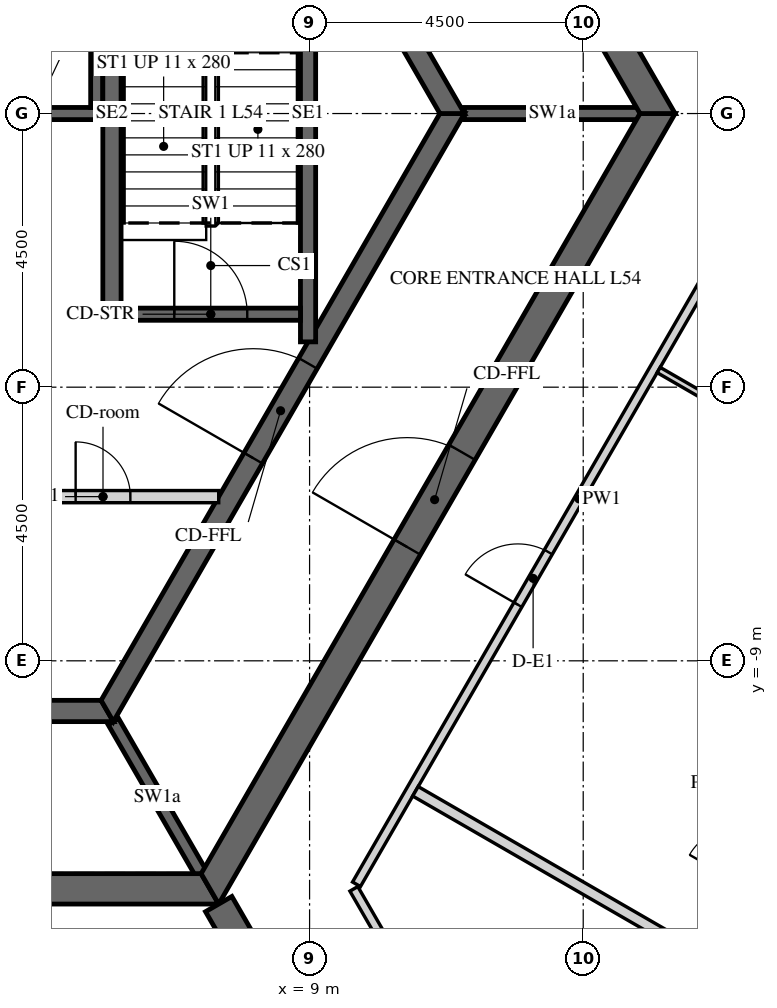
"""IFC4 building model, lengths in metres.
Left out: names, types, materials, properties, quantities, classifications, styles, units other than length and angle.
Written with IfcOpenShell. Run it as: python <this file> out.ifc"""

import sys

from ifc_helpers import new_model, si_unit, direction, frame, frame_2d, origin, place, context, subcontext, project, spatial, polyline, rectangle, outline, extrude, element, fill, save


model = new_model("IFC4")
c1 = context("Model", 3, precision=1e-05, world=origin(), true_north=direction((0.0, 1.0)))
c2 = subcontext(c1, "Body", "Model", "MODEL_VIEW")
j1 = project(units=[si_unit("LENGTHUNIT", "METRE"), si_unit("PLANEANGLEUNIT", "RADIAN")], contexts=[c1])
p1 = place(None, origin())
s1 = spatial("IfcSite", under=j1, at=p1, CompositionType="ELEMENT")
p2 = place(p1, origin())
s2 = spatial("IfcBuilding", under=s1, at=p2, CompositionType="ELEMENT")
p3 = place(p2, frame((0.0, 0.0, 226.8)))
s3 = spatial("IfcBuildingStorey", under=s2, at=p3, CompositionType="ELEMENT", Elevation=226.8)
p4 = place(p3, frame((-7.361, -12.75, -0.15), z_axis=(0.0, 0.0, 1.0), x_axis=(1.0, 0.0, 0.0)))
e1 = element("IfcWall", 1, at=p4, inside=s3, PredefinedType="SHEAR", context=c2, shape_type="SweptSolid", body=[
    extrude(outline(polyline([(-0.144, -0.25), (14.866, -0.25), (14.578, 0.25), (0.144, 0.25), (-0.144, -0.25)])), origin(), (0.0, 0.0, 1.0), 3.9),
])
p5 = place(p4, frame((6.761, 0.0, 0.15)))
e2 = element("IfcOpeningElement", 2, at=p5, cuts=e1, PredefinedType="OPENING", context=c2, shape_type="SweptSolid", body=[
    extrude(rectangle(XDim=1.2, YDim=2.4, at=frame_2d((0.6, 1.2))), frame((0.0, 0.26, 0.0), z_axis=(0.0, -1.0, 0.0), x_axis=(1.0, 0.0, 0.0)), (0.0, 0.0, 1.0), 0.52),
])
p6 = place(p3, frame((7.361, -12.75, -0.15), z_axis=(0.0, 0.0, 1.0), x_axis=(0.50000571537, 0.866022103989, 0.0)))
e3 = element("IfcWall", 3, at=p6, inside=s3, PredefinedType="SHEAR", context=c2, shape_type="SweptSolid", body=[
    extrude(outline(polyline([(-0.144, -0.25), (14.867, -0.25), (14.578, 0.25), (0.144, 0.25), (-0.144, -0.25)])), origin(), (0.0, 0.0, 1.0), 3.9),
])
p7 = place(p6, frame((6.49, 0.0, 0.15)))
e4 = element("IfcOpeningElement", 4, at=p7, cuts=e3, PredefinedType="OPENING", context=c2, shape_type="SweptSolid", body=[
    extrude(rectangle(XDim=1.8, YDim=2.4, at=frame_2d((0.9, 1.2))), frame((0.0, 0.26, 0.0), z_axis=(0.0, -1.0, 0.0), x_axis=(1.0, 0.0, 0.0)), (0.0, 0.0, 1.0), 0.52),
])
p8 = place(p3, frame((14.722, 0.0, -0.15), z_axis=(0.0, 0.0, 1.0), x_axis=(-0.50000571537, 0.866022103989, 0.0)))
e5 = element("IfcWall", 5, at=p8, inside=s3, PredefinedType="SHEAR", context=c2, shape_type="SweptSolid", body=[
    extrude(outline(polyline([(-0.144, -0.25), (14.867, -0.25), (14.578, 0.25), (0.144, 0.25), (-0.144, -0.25)])), origin(), (0.0, 0.0, 1.0), 3.9),
])
p9 = place(p8, frame((6.432, 0.0, 0.15)))
e6 = element("IfcOpeningElement", 6, at=p9, cuts=e5, PredefinedType="OPENING", context=c2, shape_type="SweptSolid", body=[
    extrude(rectangle(XDim=1.8, YDim=2.4, at=frame_2d((0.9, 1.2))), frame((0.0, 0.26, 0.0), z_axis=(0.0, -1.0, 0.0), x_axis=(1.0, 0.0, 0.0)), (0.0, 0.0, 1.0), 0.52),
])
p10 = place(p3, frame((7.506, -13.0, -0.15), z_axis=(0.0, 0.0, 1.0), x_axis=(0.499988271576, -0.866032175087, 0.0)))
e7 = element("IfcWall", 7, at=p10, inside=s3, PredefinedType="SHEAR", context=c2, shape_type="SweptSolid", body=[
    extrude(rectangle(XDim=15.424, YDim=0.5, at=frame_2d((7.712, 0.0))), origin(), (0.0, 0.0, 1.0), 3.9),
])
p11 = place(p10, frame((6.812, 0.0, 0.15)))
e8 = element("IfcOpeningElement", 8, at=p11, cuts=e7, PredefinedType="OPENING", context=c2, shape_type="SweptSolid", body=[
    extrude(rectangle(XDim=1.8, YDim=2.4, at=frame_2d((0.9, 1.2))), frame((0.0, 0.26, 0.0), z_axis=(0.0, -1.0, 0.0), x_axis=(1.0, 0.0, 0.0)), (0.0, 0.0, 1.0), 0.52),
])
p12 = place(p3, frame((-5.673, -9.825, -0.15), z_axis=(0.0, 0.0, 1.0), x_axis=(1.0, 0.0, 0.0)))
e9 = element("IfcWall", 9, at=p12, inside=s3, PredefinedType="SHEAR", context=c2, shape_type="SweptSolid", body=[
    extrude(outline(polyline([(-0.101, -0.175), (11.446, -0.175), (11.244, 0.175), (0.101, 0.175), (-0.101, -0.175)])), origin(), (0.0, 0.0, 1.0), 3.9),
])
p13 = place(p3, frame((5.673, -9.825, -0.15), z_axis=(0.0, 0.0, 1.0), x_axis=(0.499995046907, 0.866028263435, 0.0)))
e10 = element("IfcWall", 10, at=p13, inside=s3, PredefinedType="SHEAR", context=c2, shape_type="SweptSolid", body=[
    extrude(outline(polyline([(-0.101, -0.175), (11.446, -0.175), (11.244, 0.175), (0.101, 0.175), (-0.101, -0.175)])), origin(), (0.0, 0.0, 1.0), 3.9),
])
p14 = place(p13, frame((4.801, 0.0, 0.15)))
e11 = element("IfcOpeningElement", 11, at=p14, cuts=e10, PredefinedType="OPENING", context=c2, shape_type="SweptSolid", body=[
    extrude(rectangle(XDim=1.8, YDim=2.4, at=frame_2d((0.9, 1.2))), frame((0.0, 0.185, 0.0), z_axis=(0.0, -1.0, 0.0), x_axis=(1.0, 0.0, 0.0)), (0.0, 0.0, 1.0), 0.37),
])
p15 = place(p3, frame((11.345, 0.0, -0.15), z_axis=(0.0, 0.0, 1.0), x_axis=(-0.499995046907, 0.866028263435, 0.0)))
e12 = element("IfcWall", 12, at=p15, inside=s3, PredefinedType="SHEAR", context=c2, shape_type="SweptSolid", body=[
    extrude(outline(polyline([(-0.101, -0.175), (11.446, -0.175), (11.244, 0.175), (0.101, 0.175), (-0.101, -0.175)])), origin(), (0.0, 0.0, 1.0), 3.9),
])
p16 = place(p15, frame((4.744, 0.0, 0.15)))
e13 = element("IfcOpeningElement", 13, at=p16, cuts=e12, PredefinedType="OPENING", context=c2, shape_type="SweptSolid", body=[
    extrude(rectangle(XDim=1.8, YDim=2.4, at=frame_2d((0.9, 1.2))), frame((0.0, 0.185, 0.0), z_axis=(0.0, -1.0, 0.0), x_axis=(1.0, 0.0, 0.0)), (0.0, 0.0, 1.0), 0.37),
])
p17 = place(p3, frame((-5.6, 0.0, -0.25), z_axis=(0.0, 0.0, 1.0), x_axis=(1.0, 0.0, 0.0)))
e14 = element("IfcWall", 14, at=p17, inside=s3, PredefinedType="SHEAR", context=c2, shape_type="SweptSolid", body=[
    extrude(rectangle(XDim=11.2, YDim=0.2, at=frame_2d((5.6, 0.0))), origin(), (0.0, 0.0, 1.0), 3.9),
])
p18 = place(p3, frame((5.5, 0.1, -0.25), z_axis=(0.0, 0.0, 1.0), x_axis=(0.0, 1.0, 0.0)))
e15 = element("IfcWall", 15, at=p18, inside=s3, PredefinedType="SHEAR", context=c2, shape_type="SweptSolid", body=[
    extrude(rectangle(XDim=3.1, YDim=0.2, at=frame_2d((1.55, 0.0))), origin(), (0.0, 0.0, 1.0), 3.9),
])
p19 = place(p3, frame((3.7, -6.3, 0.0), z_axis=(0.0, 0.0, 1.0), x_axis=(1.0, 0.0, 0.0)))
e16 = element("IfcWall", 16, at=p19, inside=s3, PredefinedType="PARTITIONING", context=c2, shape_type="SweptSolid", body=[
    extrude(rectangle(XDim=3.806, YDim=0.2, at=frame_2d((1.903, 0.0))), origin(), (0.0, 0.0, 1.0), 3.65),
])
p20 = place(p19, frame((1.453, 0.0, 0.0)))
e17 = element("IfcOpeningElement", 17, at=p20, cuts=e16, PredefinedType="OPENING", context=c2, shape_type="SweptSolid", body=[
    extrude(rectangle(XDim=0.9, YDim=2.1, at=frame_2d((0.45, 1.05))), frame((0.0, 0.11, 0.0), z_axis=(0.0, -1.0, 0.0), x_axis=(1.0, 0.0, 0.0)), (0.0, 0.0, 1.0), 0.22),
])
for number, where, z_axis, x_axis in (
    (18, (11.547, 0.0, -0.15), (0.0, 0.0, 1.0), (1.0, 0.0, 0.0)),
    (19, (5.773, -10.0, -0.15), (0.0, 0.0, 1.0), (0.5, -0.866, 0.0)),
):
    element("IfcWall", number, at=place(p3, frame(where, z_axis=z_axis, x_axis=x_axis)), inside=s3, PredefinedType="SHEAR", context=c2, shape_type="SweptSolid", body=[
        extrude(rectangle(XDim=2.887, YDim=0.2, at=frame_2d((1.443, 0.0))), origin(), (0.0, 0.0, 1.0), 3.9),
    ])
p21 = place(p3, frame((5.75, -3.4, -0.25), z_axis=(0.0, 0.0, 1.0), x_axis=(0.0, 1.0, 0.0)))
e20 = element("IfcWall", 20, at=p21, inside=s3, PredefinedType="SHEAR", context=c2, shape_type="SweptSolid", body=[
    extrude(rectangle(XDim=6.8, YDim=0.3, at=frame_2d((3.4, 0.0))), origin(), (0.0, 0.0, 1.0), 3.9),
])
p22 = place(p3, frame((8.975, -3.755, -0.25), z_axis=(0.0, 0.0, 1.0), x_axis=(0.0, 1.0, 0.0)))
e21 = element("IfcWall", 21, at=p22, inside=s3, PredefinedType="SHEAR", context=c2, shape_type="SweptSolid", body=[
    extrude(rectangle(XDim=7.51, YDim=0.25, at=frame_2d((3.755, 0.0))), origin(), (0.0, 0.0, 1.0), 3.9),
])
p23 = place(p3, frame((5.9, -3.3, -0.25), z_axis=(0.0, 0.0, 1.0), x_axis=(1.0, 0.0, 0.0)))
e22 = element("IfcWall", 22, at=p23, inside=s3, PredefinedType="SHEAR", context=c2, shape_type="SweptSolid", body=[
    extrude(rectangle(XDim=2.95, YDim=0.2, at=frame_2d((1.475, 0.0))), origin(), (0.0, 0.0, 1.0), 3.9),
])
p24 = place(p23, frame((0.875, 0.0, 0.25)))
e23 = element("IfcOpeningElement", 23, at=p24, cuts=e22, PredefinedType="OPENING", context=c2, shape_type="SweptSolid", body=[
    extrude(rectangle(XDim=1.2, YDim=2.4, at=frame_2d((0.6, 1.2))), frame((0.0, 0.11, 0.0), z_axis=(0.0, -1.0, 0.0), x_axis=(1.0, 0.0, 0.0)), (0.0, 0.0, 1.0), 0.22),
])
p25 = place(p3, frame((13.699, -19.628, 0.0), z_axis=(0.0, 0.0, 1.0), x_axis=(-0.499997422768, 0.866026891745, 0.0)))
e24 = element("IfcWall", 24, at=p25, inside=s3, PredefinedType="PARTITIONING", context=c2, shape_type="SweptSolid", body=[
    extrude(rectangle(XDim=7.942, YDim=0.15, at=frame_2d((3.971, 0.0))), origin(), (0.0, 0.0, 1.0), 2.988),
])
p26 = place(p25, frame((4.634, 0.0, 0.0)))
e25 = element("IfcOpeningElement", 25, at=p26, cuts=e24, PredefinedType="OPENING", context=c2, shape_type="SweptSolid", body=[
    extrude(rectangle(XDim=1.0, YDim=2.1, at=frame_2d((0.5, 1.05))), frame((0.0, 0.085, 0.0), z_axis=(0.0, -1.0, 0.0), x_axis=(1.0, 0.0, 0.0)), (0.0, 0.0, 1.0), 0.17),
])
p27 = place(p3, frame((9.772, -12.675, 0.0), z_axis=(0.0, 0.0, 1.0), x_axis=(0.499996322767, 0.866027526826, 0.0)))
e26 = element("IfcWall", 26, at=p27, inside=s3, PredefinedType="PARTITIONING", context=c2, shape_type="SweptSolid", body=[
    extrude(rectangle(XDim=14.636, YDim=0.15, at=frame_2d((7.318, 0.0))), origin(), (0.0, 0.0, 1.0), 2.988),
])
p28 = place(p27, frame((5.309, 0.0, 0.0)))
e27 = element("IfcOpeningElement", 27, at=p28, cuts=e26, PredefinedType="OPENING", context=c2, shape_type="SweptSolid", body=[
    extrude(rectangle(XDim=1.0, YDim=2.1, at=frame_2d((0.5, 1.05))), frame((0.0, 0.085, 0.0), z_axis=(0.0, -1.0, 0.0), x_axis=(1.0, 0.0, 0.0)), (0.0, 0.0, 1.0), 0.17),
])
p29 = place(p27, frame((13.486, 0.0, 0.0)))
e28 = element("IfcOpeningElement", 28, at=p29, cuts=e26, PredefinedType="OPENING", context=c2, shape_type="SweptSolid", body=[
    extrude(rectangle(XDim=1.0, YDim=2.1, at=frame_2d((0.5, 1.05))), frame((0.0, 0.085, 0.0), z_axis=(0.0, -1.0, 0.0), x_axis=(1.0, 0.0, 0.0)), (0.0, 0.0, 1.0), 0.17),
])
p30 = place(p3, frame((17.046, 0.075, 0.0), z_axis=(0.0, 0.0, 1.0), x_axis=(-0.499996322767, 0.866027526826, 0.0)))
e29 = element("IfcWall", 29, at=p30, inside=s3, PredefinedType="PARTITIONING", context=c2, shape_type="SweptSolid", body=[
    extrude(rectangle(XDim=14.636, YDim=0.15, at=frame_2d((7.318, 0.0))), origin(), (0.0, 0.0, 1.0), 2.988),
])
p31 = place(p30, frame((1.781, 0.0, 0.0)))
e30 = element("IfcOpeningElement", 30, at=p31, cuts=e29, PredefinedType="OPENING", context=c2, shape_type="SweptSolid", body=[
    extrude(rectangle(XDim=1.0, YDim=2.1, at=frame_2d((0.5, 1.05))), frame((0.0, 0.085, 0.0), z_axis=(0.0, -1.0, 0.0), x_axis=(1.0, 0.0, 0.0)), (0.0, 0.0, 1.0), 0.17),
])
p32 = place(p30, frame((7.872, 0.0, 0.0)))
e31 = element("IfcOpeningElement", 31, at=p32, cuts=e29, PredefinedType="OPENING", context=c2, shape_type="SweptSolid", body=[
    extrude(rectangle(XDim=1.0, YDim=2.1, at=frame_2d((0.5, 1.05))), frame((0.0, 0.085, 0.0), z_axis=(0.0, -1.0, 0.0), x_axis=(1.0, 0.0, 0.0)), (0.0, 0.0, 1.0), 0.17),
])
p33 = place(p30, frame((13.203, 0.0, 0.0)))
e32 = element("IfcOpeningElement", 32, at=p33, cuts=e29, PredefinedType="OPENING", context=c2, shape_type="SweptSolid", body=[
    extrude(rectangle(XDim=1.0, YDim=2.1, at=frame_2d((0.5, 1.05))), frame((0.0, 0.085, 0.0), z_axis=(0.0, -1.0, 0.0), x_axis=(1.0, 0.0, 0.0)), (0.0, 0.0, 1.0), 0.17),
])
p34 = place(p3, frame((21.631, -17.433, 0.0), z_axis=(0.0, 0.0, 1.0), x_axis=(-0.866032662629, 0.499987427101, 0.0)))
e33 = element("IfcWall", 33, at=p34, inside=s3, PredefinedType="PARTITIONING", context=c2, shape_type="SweptSolid", body=[
    extrude(rectangle(XDim=12.575, YDim=0.18, at=frame_2d((6.288, 0.0))), origin(), (0.0, 0.0, 1.0), 2.988),
])
p35 = place(p3, frame((17.231, -5.655, 0.0), z_axis=(0.0, 0.0, 1.0), x_axis=(-0.866039941686, 0.499974818771, 0.0)))
e34 = element("IfcWall", 34, at=p35, inside=s3, PredefinedType="PARTITIONING", context=c2, shape_type="SweptSolid", body=[
    extrude(rectangle(XDim=2.875, YDim=0.1, at=frame_2d((1.438, 0.0))), origin(), (0.0, 0.0, 1.0), 2.988),
])
p36 = place(p35, frame((1.05, 0.0, 0.0)))
e35 = element("IfcOpeningElement", 35, at=p36, cuts=e34, PredefinedType="OPENING", context=c2, shape_type="SweptSolid", body=[
    extrude(rectangle(XDim=0.8, YDim=2.1, at=frame_2d((0.4, 1.05))), frame((0.0, 0.06, 0.0), z_axis=(0.0, -1.0, 0.0), x_axis=(1.0, 0.0, 0.0)), (0.0, 0.0, 1.0), 0.12),
])
p37 = place(p3, frame((15.398, -13.73, 0.0), z_axis=(0.0, 0.0, 1.0), x_axis=(0.499969314921, 0.866043119098, 0.0)))
e36 = element("IfcWall", 36, at=p37, inside=s3, PredefinedType="PARTITIONING", context=c2, shape_type="SweptSolid", body=[
    extrude(rectangle(XDim=3.51, YDim=0.1, at=frame_2d((1.755, 0.0))), origin(), (0.0, 0.0, 1.0), 2.988),
])
p38 = place(p37, frame((1.26, 0.0, 0.0)))
e37 = element("IfcOpeningElement", 37, at=p38, cuts=e36, PredefinedType="OPENING", context=c2, shape_type="SweptSolid", body=[
    extrude(rectangle(XDim=0.9, YDim=2.1, at=frame_2d((0.45, 1.05))), frame((0.0, 0.06, 0.0), z_axis=(0.0, -1.0, 0.0), x_axis=(1.0, 0.0, 0.0)), (0.0, 0.0, 1.0), 0.12),
])
p39 = place(p7, origin())
e38 = element("IfcDoor", 38, at=p39, inside=s3, OperationType="DOUBLE_DOOR_SINGLE_SWING", PredefinedType="DOOR", context=c2, shape_type="SweptSolid", body=[
    extrude(rectangle(XDim=1.8, YDim=2.4, at=frame_2d((0.9, 1.2))), frame((0.0, 0.025, 0.0), z_axis=(0.0, -1.0, 0.0), x_axis=(1.0, 0.0, 0.0)), (0.0, 0.0, 1.0), 0.05),
])
fill(e4, e38)
p40 = place(p14, origin())
e39 = element("IfcDoor", 39, at=p40, inside=s3, OperationType="DOUBLE_DOOR_SINGLE_SWING", PredefinedType="DOOR", context=c2, shape_type="SweptSolid", body=[
    extrude(rectangle(XDim=1.8, YDim=2.4, at=frame_2d((0.9, 1.2))), frame((0.0, 0.025, 0.0), z_axis=(0.0, -1.0, 0.0), x_axis=(1.0, 0.0, 0.0)), (0.0, 0.0, 1.0), 0.05),
])
fill(e11, e39)
p41 = place(p20, origin())
e40 = element("IfcDoor", 40, at=p41, inside=s3, OperationType="SINGLE_SWING_LEFT", PredefinedType="DOOR", context=c2, shape_type="SweptSolid", body=[
    extrude(rectangle(XDim=0.9, YDim=2.1, at=frame_2d((0.45, 1.05))), frame((0.0, 0.025, 0.0), z_axis=(0.0, -1.0, 0.0), x_axis=(1.0, 0.0, 0.0)), (0.0, 0.0, 1.0), 0.05),
])
fill(e17, e40)
p42 = place(p24, origin())
e41 = element("IfcDoor", 41, at=p42, inside=s3, OperationType="SINGLE_SWING_LEFT", PredefinedType="DOOR", context=c2, shape_type="SweptSolid", body=[
    extrude(rectangle(XDim=1.2, YDim=2.4, at=frame_2d((0.6, 1.2))), frame((0.0, 0.025, 0.0), z_axis=(0.0, -1.0, 0.0), x_axis=(1.0, 0.0, 0.0)), (0.0, 0.0, 1.0), 0.05),
])
fill(e23, e41)
p43 = place(p28, origin())
e42 = element("IfcDoor", 42, at=p43, inside=s3, OperationType="SINGLE_SWING_LEFT", PredefinedType="DOOR", context=c2, shape_type="SweptSolid", body=[
    extrude(rectangle(XDim=1.0, YDim=2.1, at=frame_2d((0.5, 1.05))), frame((0.0, 0.025, 0.0), z_axis=(0.0, -1.0, 0.0), x_axis=(1.0, 0.0, 0.0)), (0.0, 0.0, 1.0), 0.05),
])
fill(e27, e42)
save(model, sys.argv[1])
